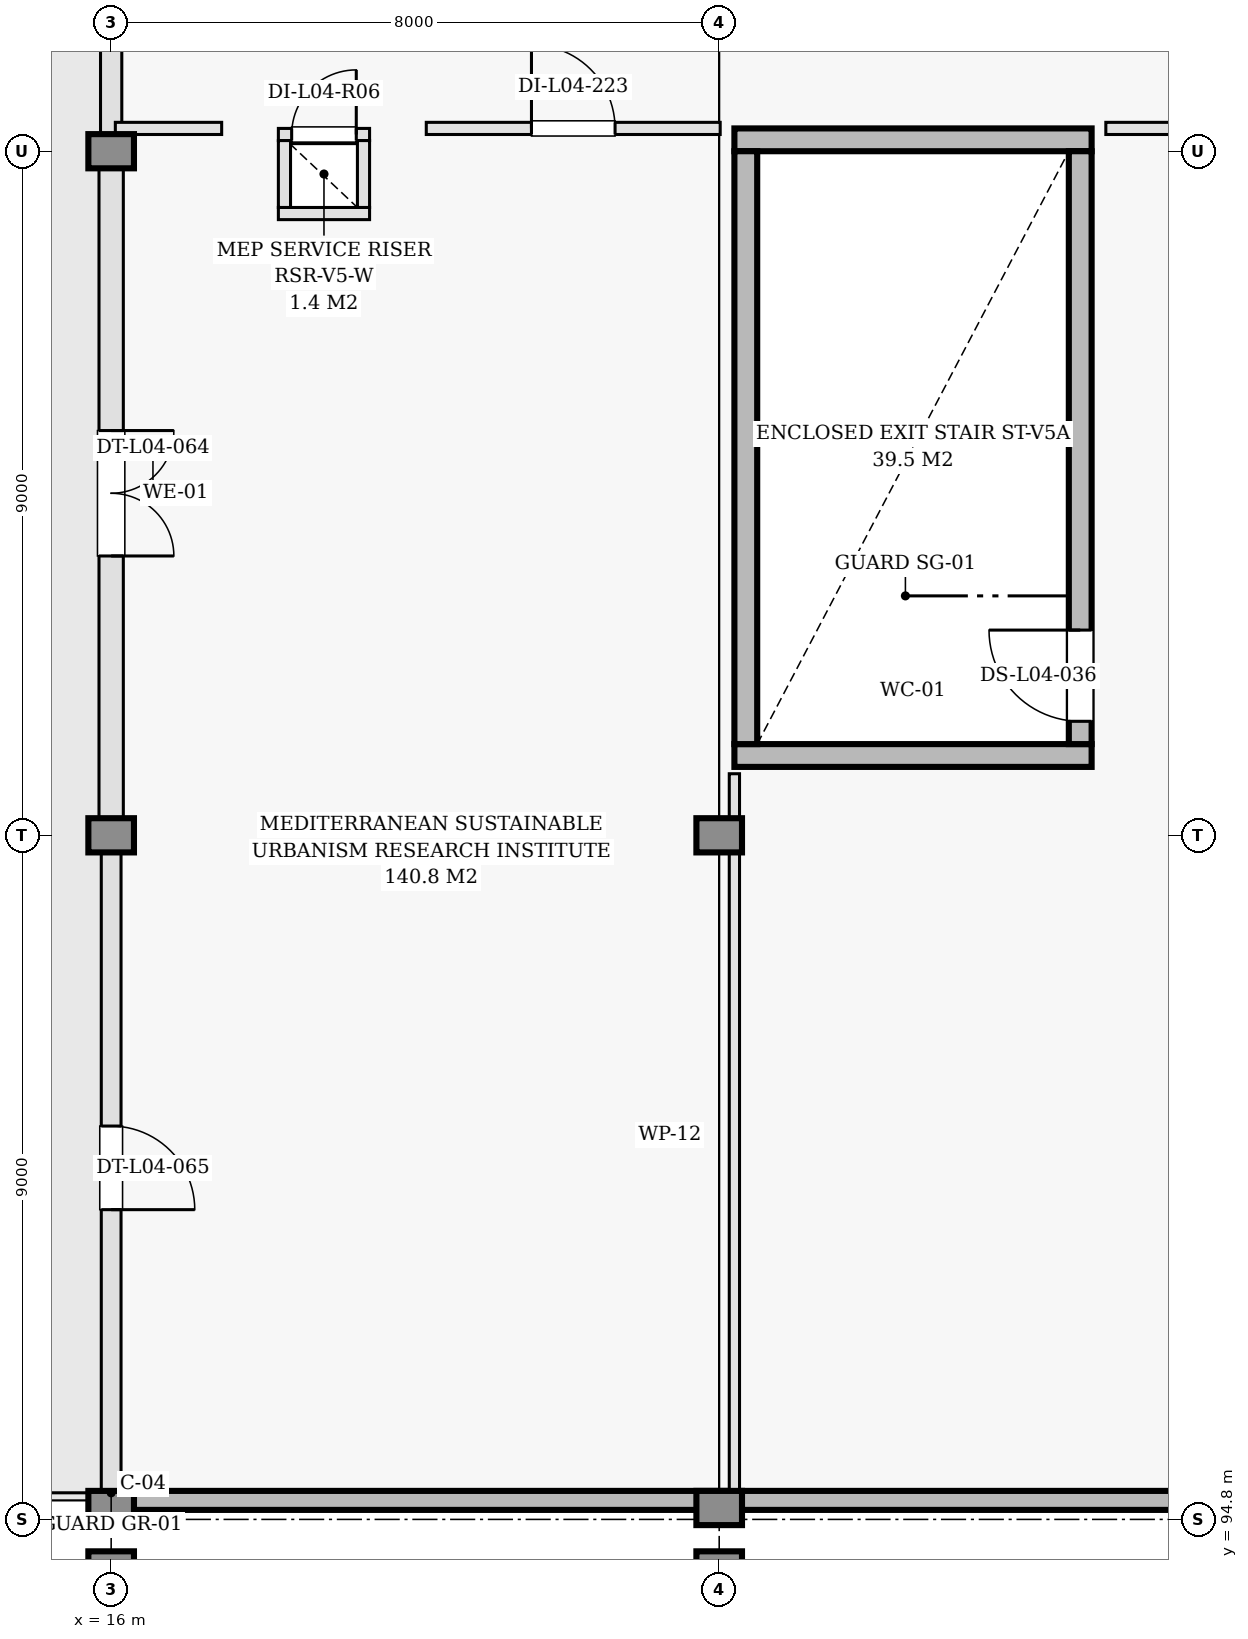
"""IFC4 building model, lengths in metres.
Left out: names, types, materials, properties, quantities, classifications, styles, units other than length and angle.
Written with IfcOpenShell. Run it as: python <this file> out.ifc"""

import sys

from ifc_helpers import new_model, si_unit, direction, frame, frame_2d, origin, origin_2d, place, context, subcontext, project, spatial, rectangle, extrude, element, fill, save


model = new_model("IFC4")
c1 = context("Model", 3, precision=1e-05, world=origin(), true_north=direction((0.0, 1.0)))
c2 = subcontext(c1, "Body", "Model", "MODEL_VIEW")
j1 = project(units=[si_unit("LENGTHUNIT", "METRE"), si_unit("PLANEANGLEUNIT", "RADIAN")], contexts=[c1])
p1 = place(None, origin())
s1 = spatial("IfcSite", under=j1, at=p1, CompositionType="ELEMENT")
p2 = place(p1, origin())
s2 = spatial("IfcBuilding", under=s1, at=p2, CompositionType="ELEMENT")
p3 = place(p2, frame((0.0, 0.0, 18.0)))
s3 = spatial("IfcBuildingStorey", under=s2, at=p3, CompositionType="ELEMENT", Elevation=18.0)
for number, where, z_axis, x_axis in (
    (1, (16.0, 94.95, 0.0), (0.0, 0.0, 1.0), (1.0, 0.0, 0.0)),
    (2, (16.0, 103.8, 0.0), (0.0, 0.0, 1.0), (1.0, 0.0, 0.0)),
    (3, (16.0, 112.8, 0.0), (0.0, 0.0, 1.0), (1.0, 0.0, 0.0)),
    (4, (24.0, 94.95, 0.0), (0.0, 0.0, 1.0), (1.0, 0.0, 0.0)),
    (5, (24.0, 103.8, 0.0), (0.0, 0.0, 1.0), (1.0, 0.0, 0.0)),
):
    element("IfcColumn", number, at=place(p3, frame(where, z_axis=z_axis, x_axis=x_axis)), inside=s3, PredefinedType="COLUMN", context=c2, shape_type="SweptSolid", body=[
        extrude(rectangle(XDim=0.45, YDim=0.45, at=origin_2d()), origin(), (0.0, 0.0, 1.0), 4.2),
    ])
for number, where, z_axis, x_axis in (
    (6, (16.0, 94.2, 0.0), (0.0, 0.0, 1.0), (1.0, 0.0, 0.0)),
    (7, (24.0, 94.2, 0.0), (0.0, 0.0, 1.0), (1.0, 0.0, 0.0)),
):
    element("IfcColumn", number, at=place(p3, frame(where, z_axis=z_axis, x_axis=x_axis)), inside=s3, PredefinedType="COLUMN", context=c2, shape_type="SweptSolid", body=[
        extrude(rectangle(XDim=0.36, YDim=0.36, at=origin_2d()), origin(), (0.0, 0.0, 1.0), 2.229),
    ])
p4 = place(p3, frame((16.0, 95.05, 0.0), z_axis=(0.0, 0.0, 1.0), x_axis=(1.0, 0.0, 0.0)))
e8 = element("IfcWall", 8, at=p4, inside=s3, PredefinedType="SHEAR", context=c2, shape_type="SweptSolid", body=[
    extrude(rectangle(XDim=32.0, YDim=0.25, at=frame_2d((16.0, 0.0))), origin(), (0.0, 0.0, 1.0), 3.94),
])
p5 = place(p3, frame((16.0, 121.8, 0.0), z_axis=(0.0, 0.0, 1.0), x_axis=(0.0, -1.0, 0.0)))
e9 = element("IfcWall", 9, at=p5, inside=s3, PredefinedType="SOLIDWALL", context=c2, shape_type="SweptSolid", body=[
    extrude(rectangle(XDim=9.0, YDim=0.28, at=frame_2d((4.5, 0.0))), origin(), (0.0, 0.0, 1.0), 3.94),
])
p6 = place(p5, frame((3.6, 0.0, 0.0)))
e10 = element("IfcOpeningElement", 10, at=p6, cuts=e9, PredefinedType="OPENING", context=c2, shape_type="SweptSolid", body=[
    extrude(rectangle(XDim=1.8, YDim=2.25, at=frame_2d((0.9, 1.125))), frame((0.0, 0.15, 0.0), z_axis=(0.0, -1.0, 0.0), x_axis=(1.0, 0.0, 0.0)), (0.0, 0.0, 1.0), 0.3),
])
p7 = place(p3, frame((16.0, 112.8, 0.0), z_axis=(0.0, 0.0, 1.0), x_axis=(0.0, -1.0, 0.0)))
e11 = element("IfcWall", 11, at=p7, inside=s3, PredefinedType="SOLIDWALL", context=c2, shape_type="SweptSolid", body=[
    extrude(rectangle(XDim=9.0, YDim=0.32, at=frame_2d((4.5, 0.0))), origin(), (0.0, 0.0, 1.0), 3.94),
])
p8 = place(p7, frame((3.675, 0.0, 0.0)))
e12 = element("IfcOpeningElement", 12, at=p8, cuts=e11, PredefinedType="OPENING", context=c2, shape_type="SweptSolid", body=[
    extrude(rectangle(XDim=1.65, YDim=2.2, at=frame_2d((0.825, 1.1))), frame((0.0, 0.17, 0.0), z_axis=(0.0, -1.0, 0.0), x_axis=(1.0, 0.0, 0.0)), (0.0, 0.0, 1.0), 0.34),
])
p9 = place(p3, frame((16.0, 103.8, 0.0), z_axis=(0.0, 0.0, 1.0), x_axis=(0.0, -1.0, 0.0)))
e13 = element("IfcWall", 13, at=p9, inside=s3, PredefinedType="SOLIDWALL", context=c2, shape_type="SweptSolid", body=[
    extrude(rectangle(XDim=8.75, YDim=0.26, at=frame_2d((4.375, 0.0))), origin(), (0.0, 0.0, 1.0), 3.94),
])
p10 = place(p9, frame((3.825, 0.0, 0.0)))
e14 = element("IfcOpeningElement", 14, at=p10, cuts=e13, PredefinedType="OPENING", context=c2, shape_type="SweptSolid", body=[
    extrude(rectangle(XDim=1.1, YDim=2.2, at=frame_2d((0.55, 1.1))), frame((0.0, 0.14, 0.0), z_axis=(0.0, -1.0, 0.0), x_axis=(1.0, 0.0, 0.0)), (0.0, 0.0, 1.0), 0.28),
])
for number, where, z_axis, x_axis in (
    (15, (24.2, 104.85, 0.0), (0.0, 0.0, 1.0), (1.0, 0.0, 0.0)),
    (16, (24.2, 112.95, 0.0), (0.0, 0.0, 1.0), (1.0, 0.0, 0.0)),
):
    element("IfcWall", number, at=place(p3, frame(where, z_axis=z_axis, x_axis=x_axis)), inside=s3, PredefinedType="SHEAR", context=c2, shape_type="SweptSolid", body=[
        extrude(rectangle(XDim=4.7, YDim=0.3, at=frame_2d((2.35, 0.0))), origin(), (0.0, 0.0, 1.0), 4.0),
    ])
p11 = place(p3, frame((24.35, 105.0, 0.0), z_axis=(0.0, 0.0, 1.0), x_axis=(0.0, 1.0, 0.0)))
e17 = element("IfcWall", 17, at=p11, inside=s3, PredefinedType="SHEAR", context=c2, shape_type="SweptSolid", body=[
    extrude(rectangle(XDim=7.8, YDim=0.3, at=frame_2d((3.9, 0.0))), origin(), (0.0, 0.0, 1.0), 4.0),
])
p12 = place(p3, frame((28.75, 105.0, 0.0), z_axis=(0.0, 0.0, 1.0), x_axis=(0.0, 1.0, 0.0)))
e18 = element("IfcWall", 18, at=p12, inside=s3, PredefinedType="SHEAR", context=c2, shape_type="SweptSolid", body=[
    extrude(rectangle(XDim=7.8, YDim=0.3, at=frame_2d((3.9, 0.0))), origin(), (0.0, 0.0, 1.0), 4.0),
])
p13 = place(p12, frame((0.3, 0.0, 0.0)))
e19 = element("IfcOpeningElement", 19, at=p13, cuts=e18, PredefinedType="OPENING", context=c2, shape_type="SweptSolid", body=[
    extrude(rectangle(XDim=1.2, YDim=2.15, at=frame_2d((0.6, 1.075))), frame((0.0, 0.16, 0.0), z_axis=(0.0, -1.0, 0.0), x_axis=(1.0, 0.0, 0.0)), (0.0, 0.0, 1.0), 0.32),
])
p14 = place(p3, frame((18.2, 111.98, 0.0), z_axis=(0.0, 0.0, 1.0), x_axis=(1.0, 0.0, 0.0)))
e20 = element("IfcWall", 20, at=p14, inside=s3, PredefinedType="PARTITIONING", context=c2, shape_type="SweptSolid", body=[
    extrude(rectangle(XDim=1.2, YDim=0.16, at=frame_2d((0.6, 0.0))), origin(), (0.0, 0.0, 1.0), 3.98),
])
p15 = place(p3, frame((18.2, 113.02, 0.0), z_axis=(0.0, 0.0, 1.0), x_axis=(1.0, 0.0, 0.0)))
e21 = element("IfcWall", 21, at=p15, inside=s3, PredefinedType="PARTITIONING", context=c2, shape_type="SweptSolid", body=[
    extrude(rectangle(XDim=1.2, YDim=0.16, at=frame_2d((0.6, 0.0))), origin(), (0.0, 0.0, 1.0), 3.98),
])
p16 = place(p15, frame((0.175, 0.0, 0.0)))
e22 = element("IfcOpeningElement", 22, at=p16, cuts=e21, PredefinedType="OPENING", context=c2, shape_type="SweptSolid", body=[
    extrude(rectangle(XDim=0.85, YDim=2.02, at=frame_2d((0.425, 1.01))), frame((0.0, 0.09, 0.0), z_axis=(0.0, -1.0, 0.0), x_axis=(1.0, 0.0, 0.0)), (0.0, 0.0, 1.0), 0.18),
])
for number, where, z_axis, x_axis in (
    (23, (18.28, 112.06, 0.0), (0.0, 0.0, 1.0), (0.0, 1.0, 0.0)),
    (24, (19.32, 112.06, 0.0), (0.0, 0.0, 1.0), (0.0, 1.0, 0.0)),
):
    element("IfcWall", number, at=place(p3, frame(where, z_axis=z_axis, x_axis=x_axis)), inside=s3, PredefinedType="PARTITIONING", context=c2, shape_type="SweptSolid", body=[
        extrude(rectangle(XDim=0.88, YDim=0.16, at=frame_2d((0.44, 0.0))), origin(), (0.0, 0.0, 1.0), 3.98),
    ])
p17 = place(p3, frame((20.146, 113.1, 0.0), z_axis=(0.0, 0.0, 1.0), x_axis=(1.0, 0.0, 0.0)))
e25 = element("IfcWall", 25, at=p17, inside=s3, PredefinedType="PARTITIONING", context=c2, shape_type="SweptSolid", body=[
    extrude(rectangle(XDim=3.867, YDim=0.16, at=frame_2d((1.934, 0.0))), origin(), (0.0, 0.0, 1.0), 3.94),
])
p18 = place(p17, frame((1.384, 0.0, 0.0)))
e26 = element("IfcOpeningElement", 26, at=p18, cuts=e25, PredefinedType="OPENING", context=c2, shape_type="SweptSolid", body=[
    extrude(rectangle(XDim=1.1, YDim=2.15, at=frame_2d((0.55, 1.075))), frame((0.0, 0.09, 0.0), z_axis=(0.0, -1.0, 0.0), x_axis=(1.0, 0.0, 0.0)), (0.0, 0.0, 1.0), 0.18),
])
p19 = place(p3, frame((16.055, 113.1, 0.0), z_axis=(0.0, 0.0, 1.0), x_axis=(1.0, 0.0, 0.0)))
e27 = element("IfcWall", 27, at=p19, inside=s3, PredefinedType="PARTITIONING", context=c2, shape_type="SweptSolid", body=[
    extrude(rectangle(XDim=1.399, YDim=0.16, at=frame_2d((0.7, 0.0))), origin(), (0.0, 0.0, 1.0), 3.94),
])
p20 = place(p3, frame((24.2, 95.105, 0.0), z_axis=(0.0, 0.0, 1.0), x_axis=(0.0, 1.0, 0.0)))
e28 = element("IfcWall", 28, at=p20, inside=s3, PredefinedType="PARTITIONING", context=c2, shape_type="SweptSolid", body=[
    extrude(rectangle(XDim=9.505, YDim=0.135, at=frame_2d((4.752, 0.0))), origin(), (0.0, 0.0, 1.0), 3.94),
])
p21 = place(p3, frame((29.087, 113.1, 0.0), z_axis=(0.0, 0.0, 1.0), x_axis=(1.0, 0.0, 0.0)))
e29 = element("IfcWall", 29, at=p21, inside=s3, PredefinedType="PARTITIONING", context=c2, shape_type="SweptSolid", body=[
    extrude(rectangle(XDim=2.873, YDim=0.16, at=frame_2d((1.437, 0.0))), origin(), (0.0, 0.0, 1.0), 3.94),
])
p22 = place(p8, origin())
e30 = element("IfcDoor", 30, at=p22, inside=s3, OperationType="DOUBLE_DOOR_SINGLE_SWING", PredefinedType="DOOR", context=c2, shape_type="SweptSolid", body=[
    extrude(rectangle(XDim=1.65, YDim=2.2, at=frame_2d((0.825, 1.1))), frame((0.0, 0.025, 0.0), z_axis=(0.0, -1.0, 0.0), x_axis=(1.0, 0.0, 0.0)), (0.0, 0.0, 1.0), 0.05),
])
fill(e12, e30)
p23 = place(p10, origin())
e31 = element("IfcDoor", 31, at=p23, inside=s3, OperationType="SINGLE_SWING_RIGHT", PredefinedType="DOOR", context=c2, shape_type="SweptSolid", body=[
    extrude(rectangle(XDim=1.1, YDim=2.2, at=frame_2d((0.55, 1.1))), frame((0.0, 0.025, 0.0), z_axis=(0.0, -1.0, 0.0), x_axis=(1.0, 0.0, 0.0)), (0.0, 0.0, 1.0), 0.05),
])
fill(e14, e31)
p24 = place(p13, origin())
e32 = element("IfcDoor", 32, at=p24, inside=s3, OperationType="SINGLE_SWING_RIGHT", PredefinedType="DOOR", context=c2, shape_type="SweptSolid", body=[
    extrude(rectangle(XDim=1.2, YDim=2.15, at=frame_2d((0.6, 1.075))), frame((0.0, 0.025, 0.0), z_axis=(0.0, -1.0, 0.0), x_axis=(1.0, 0.0, 0.0)), (0.0, 0.0, 1.0), 0.05),
])
fill(e19, e32)
p25 = place(p16, origin())
e33 = element("IfcDoor", 33, at=p25, inside=s3, OperationType="SINGLE_SWING_RIGHT", PredefinedType="DOOR", context=c2, shape_type="SweptSolid", body=[
    extrude(rectangle(XDim=0.85, YDim=2.02, at=frame_2d((0.425, 1.01))), frame((0.0, 0.025, 0.0), z_axis=(0.0, -1.0, 0.0), x_axis=(1.0, 0.0, 0.0)), (0.0, 0.0, 1.0), 0.05),
])
fill(e22, e33)
p26 = place(p18, origin())
e34 = element("IfcDoor", 34, at=p26, inside=s3, OperationType="SINGLE_SWING_LEFT", PredefinedType="DOOR", context=c2, shape_type="SweptSolid", body=[
    extrude(rectangle(XDim=1.1, YDim=2.15, at=frame_2d((0.55, 1.075))), frame((0.0, 0.025, 0.0), z_axis=(0.0, -1.0, 0.0), x_axis=(1.0, 0.0, 0.0)), (0.0, 0.0, 1.0), 0.05),
])
fill(e26, e34)
save(model, sys.argv[1])
